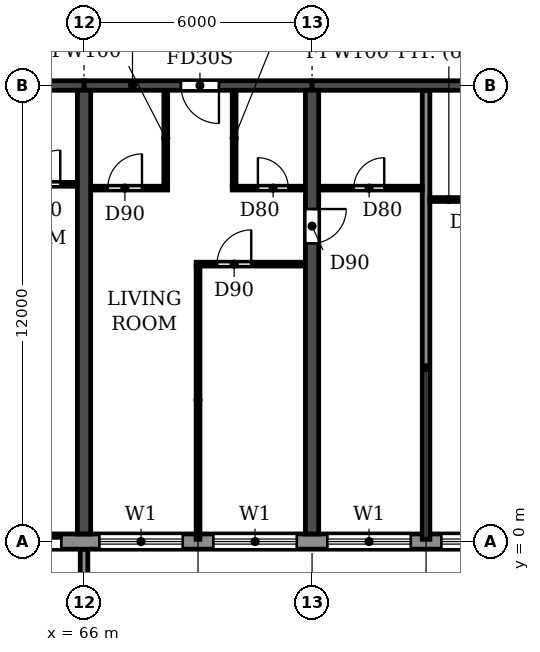
"""IFC4 building model, lengths in metres.
Left out: names, types, materials, properties, quantities, classifications, styles, units other than length and angle.
Written with IfcOpenShell. Run it as: python <this file> out.ifc"""

import sys

from ifc_helpers import new_model, si_unit, direction, frame, frame_2d, origin, place, context, subcontext, project, spatial, polyline, rectangle, outline, extrude, source, transform, mapped, element, fill, save


model = new_model("IFC4")
c1 = context("Model", 3, precision=1e-05, world=origin(), true_north=direction((0.0, 1.0)))
c2 = subcontext(c1, "Body", "Model", "MODEL_VIEW")
j1 = project(units=[si_unit("LENGTHUNIT", "METRE"), si_unit("PLANEANGLEUNIT", "RADIAN")], contexts=[c1])
p1 = place(None, origin())
s1 = spatial("IfcSite", under=j1, at=p1, CompositionType="ELEMENT")
p2 = place(p1, origin())
s2 = spatial("IfcBuilding", under=s1, at=p2, CompositionType="ELEMENT")
p3 = place(p2, frame((0.0, 0.0, 112.5)))
s3 = spatial("IfcBuildingStorey", under=s2, at=p3, CompositionType="ELEMENT", Elevation=112.5)
p4 = place(p3, frame((66.0, 0.2, 0.0), z_axis=(0.0, 0.0, 1.0), x_axis=(0.0, 1.0, 0.0)))
e1 = element("IfcWall", 1, at=p4, inside=s3, PredefinedType="SHEAR", context=c2, shape_type="SweptSolid", body=[
    extrude(rectangle(XDim=11.675, YDim=0.35, at=frame_2d((5.837, 0.0))), origin(), (0.0, 0.0, 1.0), 2.95),
])
p5 = place(p3, frame((72.0, 0.2, 0.0), z_axis=(0.0, 0.0, 1.0), x_axis=(0.0, 1.0, 0.0)))
e2 = element("IfcWall", 2, at=p5, inside=s3, PredefinedType="SHEAR", context=c2, shape_type="SweptSolid", body=[
    extrude(rectangle(XDim=11.675, YDim=0.35, at=frame_2d((5.837, 0.0))), origin(), (0.0, 0.0, 1.0), 2.95),
])
p6 = place(p5, frame((7.65, 0.0, 0.0)))
e3 = element("IfcOpeningElement", 3, at=p6, cuts=e2, PredefinedType="OPENING", context=c2, shape_type="SweptSolid", body=[
    extrude(rectangle(XDim=0.9, YDim=2.1, at=frame_2d((0.45, 1.05))), frame((0.0, 0.185, 0.0), z_axis=(0.0, -1.0, 0.0), x_axis=(1.0, 0.0, 0.0)), (0.0, 0.0, 1.0), 0.37),
])
p7 = place(p3, frame((60.0, 12.0, 0.0), z_axis=(0.0, 0.0, 1.0), x_axis=(1.0, 0.0, 0.0)))
e4 = element("IfcWall", 4, at=p7, inside=s3, PredefinedType="SHEAR", context=c2, shape_type="SweptSolid", body=[
    extrude(rectangle(XDim=6.0, YDim=0.25, at=frame_2d((3.0, 0.0))), origin(), (0.0, 0.0, 1.0), 2.35),
])
p8 = place(p7, frame((2.45, 0.0, 0.0)))
e5 = element("IfcOpeningElement", 5, at=p8, cuts=e4, PredefinedType="OPENING", context=c2, shape_type="SweptSolid", body=[
    extrude(rectangle(XDim=1.0, YDim=2.1, at=frame_2d((0.5, 1.05))), frame((0.0, 0.135, 0.0), z_axis=(0.0, -1.0, 0.0), x_axis=(1.0, 0.0, 0.0)), (0.0, 0.0, 1.0), 0.27),
])
p9 = place(p3, frame((66.0, 12.0, 0.0), z_axis=(0.0, 0.0, 1.0), x_axis=(1.0, 0.0, 0.0)))
e6 = element("IfcWall", 6, at=p9, inside=s3, PredefinedType="SHEAR", context=c2, shape_type="SweptSolid", body=[
    extrude(rectangle(XDim=6.0, YDim=0.25, at=frame_2d((3.0, 0.0))), origin(), (0.0, 0.0, 1.0), 2.35),
])
p10 = place(p9, frame((2.55, 0.0, 0.0)))
e7 = element("IfcOpeningElement", 7, at=p10, cuts=e6, PredefinedType="OPENING", context=c2, shape_type="SweptSolid", body=[
    extrude(rectangle(XDim=1.0, YDim=2.1, at=frame_2d((0.5, 1.05))), frame((0.0, 0.135, 0.0), z_axis=(0.0, -1.0, 0.0), x_axis=(1.0, 0.0, 0.0)), (0.0, 0.0, 1.0), 0.27),
])
p11 = place(p3, frame((72.0, 12.0, 0.0), z_axis=(0.0, 0.0, 1.0), x_axis=(1.0, 0.0, 0.0)))
e8 = element("IfcWall", 8, at=p11, inside=s3, PredefinedType="SHEAR", context=c2, shape_type="SweptSolid", body=[
    extrude(rectangle(XDim=6.0, YDim=0.25, at=frame_2d((3.0, 0.0))), origin(), (0.0, 0.0, 1.0), 2.35),
])
p12 = place(p3, frame((16.683, 0.0, 0.0), z_axis=(0.0, 0.0, 1.0), x_axis=(1.0, 0.0, 0.0)))
e9 = element("IfcWall", 9, at=p12, inside=s3, PredefinedType="STANDARD", context=c2, shape_type="SweptSolid", body=[
    extrude(rectangle(XDim=68.634, YDim=0.4, at=frame_2d((34.317, 0.0))), origin(), (0.0, 0.0, 1.0), 2.95),
])
p13 = place(p12, frame((1.717, 0.0, 0.9)))
e10 = element("IfcOpeningElement", 10, at=p13, cuts=e9, PredefinedType="OPENING", context=c2, shape_type="SweptSolid", body=[
    extrude(rectangle(XDim=2.2, YDim=1.5, at=frame_2d((1.1, 0.75))), frame((0.0, 0.21, 0.0), z_axis=(0.0, -1.0, 0.0), x_axis=(1.0, 0.0, 0.0)), (0.0, 0.0, 1.0), 0.42),
])
p14 = place(p12, frame((4.717, 0.0, 0.9)))
e11 = element("IfcOpeningElement", 11, at=p14, cuts=e9, PredefinedType="OPENING", context=c2, shape_type="SweptSolid", body=[
    extrude(rectangle(XDim=2.2, YDim=1.5, at=frame_2d((1.1, 0.75))), frame((0.0, 0.21, 0.0), z_axis=(0.0, -1.0, 0.0), x_axis=(1.0, 0.0, 0.0)), (0.0, 0.0, 1.0), 0.42),
])
p15 = place(p12, frame((7.717, 0.0, 0.9)))
e12 = element("IfcOpeningElement", 12, at=p15, cuts=e9, PredefinedType="OPENING", context=c2, shape_type="SweptSolid", body=[
    extrude(rectangle(XDim=2.2, YDim=1.5, at=frame_2d((1.1, 0.75))), frame((0.0, 0.21, 0.0), z_axis=(0.0, -1.0, 0.0), x_axis=(1.0, 0.0, 0.0)), (0.0, 0.0, 1.0), 0.42),
])
p16 = place(p12, frame((10.917, 0.0, 0.0)))
e13 = element("IfcOpeningElement", 13, at=p16, cuts=e9, PredefinedType="OPENING", context=c2, shape_type="SweptSolid", body=[
    extrude(rectangle(XDim=1.8, YDim=2.4, at=frame_2d((0.9, 1.2))), frame((0.0, 0.21, 0.0), z_axis=(0.0, -1.0, 0.0), x_axis=(1.0, 0.0, 0.0)), (0.0, 0.0, 1.0), 0.42),
])
p17 = place(p12, frame((13.717, 0.0, 0.9)))
e14 = element("IfcOpeningElement", 14, at=p17, cuts=e9, PredefinedType="OPENING", context=c2, shape_type="SweptSolid", body=[
    extrude(rectangle(XDim=2.2, YDim=1.5, at=frame_2d((1.1, 0.75))), frame((0.0, 0.21, 0.0), z_axis=(0.0, -1.0, 0.0), x_axis=(1.0, 0.0, 0.0)), (0.0, 0.0, 1.0), 0.42),
])
p18 = place(p12, frame((16.717, 0.0, 0.9)))
e15 = element("IfcOpeningElement", 15, at=p18, cuts=e9, PredefinedType="OPENING", context=c2, shape_type="SweptSolid", body=[
    extrude(rectangle(XDim=2.2, YDim=1.5, at=frame_2d((1.1, 0.75))), frame((0.0, 0.21, 0.0), z_axis=(0.0, -1.0, 0.0), x_axis=(1.0, 0.0, 0.0)), (0.0, 0.0, 1.0), 0.42),
])
p19 = place(p12, frame((19.717, 0.0, 0.9)))
e16 = element("IfcOpeningElement", 16, at=p19, cuts=e9, PredefinedType="OPENING", context=c2, shape_type="SweptSolid", body=[
    extrude(rectangle(XDim=2.2, YDim=1.5, at=frame_2d((1.1, 0.75))), frame((0.0, 0.21, 0.0), z_axis=(0.0, -1.0, 0.0), x_axis=(1.0, 0.0, 0.0)), (0.0, 0.0, 1.0), 0.42),
])
p20 = place(p12, frame((22.717, 0.0, 0.9)))
e17 = element("IfcOpeningElement", 17, at=p20, cuts=e9, PredefinedType="OPENING", context=c2, shape_type="SweptSolid", body=[
    extrude(rectangle(XDim=2.2, YDim=1.5, at=frame_2d((1.1, 0.75))), frame((0.0, 0.21, 0.0), z_axis=(0.0, -1.0, 0.0), x_axis=(1.0, 0.0, 0.0)), (0.0, 0.0, 1.0), 0.42),
])
p21 = place(p12, frame((25.717, 0.0, 0.9)))
e18 = element("IfcOpeningElement", 18, at=p21, cuts=e9, PredefinedType="OPENING", context=c2, shape_type="SweptSolid", body=[
    extrude(rectangle(XDim=2.2, YDim=1.5, at=frame_2d((1.1, 0.75))), frame((0.0, 0.21, 0.0), z_axis=(0.0, -1.0, 0.0), x_axis=(1.0, 0.0, 0.0)), (0.0, 0.0, 1.0), 0.42),
])
p22 = place(p12, frame((28.717, 0.0, 0.9)))
e19 = element("IfcOpeningElement", 19, at=p22, cuts=e9, PredefinedType="OPENING", context=c2, shape_type="SweptSolid", body=[
    extrude(rectangle(XDim=2.2, YDim=1.5, at=frame_2d((1.1, 0.75))), frame((0.0, 0.21, 0.0), z_axis=(0.0, -1.0, 0.0), x_axis=(1.0, 0.0, 0.0)), (0.0, 0.0, 1.0), 0.42),
])
p23 = place(p12, frame((31.917, 0.0, 0.0)))
e20 = element("IfcOpeningElement", 20, at=p23, cuts=e9, PredefinedType="OPENING", context=c2, shape_type="SweptSolid", body=[
    extrude(rectangle(XDim=1.8, YDim=2.4, at=frame_2d((0.9, 1.2))), frame((0.0, 0.21, 0.0), z_axis=(0.0, -1.0, 0.0), x_axis=(1.0, 0.0, 0.0)), (0.0, 0.0, 1.0), 0.42),
])
p24 = place(p12, frame((34.717, 0.0, 0.9)))
e21 = element("IfcOpeningElement", 21, at=p24, cuts=e9, PredefinedType="OPENING", context=c2, shape_type="SweptSolid", body=[
    extrude(rectangle(XDim=2.2, YDim=1.5, at=frame_2d((1.1, 0.75))), frame((0.0, 0.21, 0.0), z_axis=(0.0, -1.0, 0.0), x_axis=(1.0, 0.0, 0.0)), (0.0, 0.0, 1.0), 0.42),
])
p25 = place(p12, frame((37.717, 0.0, 0.9)))
e22 = element("IfcOpeningElement", 22, at=p25, cuts=e9, PredefinedType="OPENING", context=c2, shape_type="SweptSolid", body=[
    extrude(rectangle(XDim=2.2, YDim=1.5, at=frame_2d((1.1, 0.75))), frame((0.0, 0.21, 0.0), z_axis=(0.0, -1.0, 0.0), x_axis=(1.0, 0.0, 0.0)), (0.0, 0.0, 1.0), 0.42),
])
p26 = place(p12, frame((40.717, 0.0, 0.9)))
e23 = element("IfcOpeningElement", 23, at=p26, cuts=e9, PredefinedType="OPENING", context=c2, shape_type="SweptSolid", body=[
    extrude(rectangle(XDim=2.2, YDim=1.5, at=frame_2d((1.1, 0.75))), frame((0.0, 0.21, 0.0), z_axis=(0.0, -1.0, 0.0), x_axis=(1.0, 0.0, 0.0)), (0.0, 0.0, 1.0), 0.42),
])
p27 = place(p12, frame((43.717, 0.0, 0.9)))
e24 = element("IfcOpeningElement", 24, at=p27, cuts=e9, PredefinedType="OPENING", context=c2, shape_type="SweptSolid", body=[
    extrude(rectangle(XDim=2.2, YDim=1.5, at=frame_2d((1.1, 0.75))), frame((0.0, 0.21, 0.0), z_axis=(0.0, -1.0, 0.0), x_axis=(1.0, 0.0, 0.0)), (0.0, 0.0, 1.0), 0.42),
])
p28 = place(p12, frame((46.917, 0.0, 0.0)))
e25 = element("IfcOpeningElement", 25, at=p28, cuts=e9, PredefinedType="OPENING", context=c2, shape_type="SweptSolid", body=[
    extrude(rectangle(XDim=1.8, YDim=2.4, at=frame_2d((0.9, 1.2))), frame((0.0, 0.21, 0.0), z_axis=(0.0, -1.0, 0.0), x_axis=(1.0, 0.0, 0.0)), (0.0, 0.0, 1.0), 0.42),
])
p29 = place(p12, frame((49.717, 0.0, 0.9)))
e26 = element("IfcOpeningElement", 26, at=p29, cuts=e9, PredefinedType="OPENING", context=c2, shape_type="SweptSolid", body=[
    extrude(rectangle(XDim=2.2, YDim=1.5, at=frame_2d((1.1, 0.75))), frame((0.0, 0.21, 0.0), z_axis=(0.0, -1.0, 0.0), x_axis=(1.0, 0.0, 0.0)), (0.0, 0.0, 1.0), 0.42),
])
p30 = place(p12, frame((52.717, 0.0, 0.9)))
e27 = element("IfcOpeningElement", 27, at=p30, cuts=e9, PredefinedType="OPENING", context=c2, shape_type="SweptSolid", body=[
    extrude(rectangle(XDim=2.2, YDim=1.5, at=frame_2d((1.1, 0.75))), frame((0.0, 0.21, 0.0), z_axis=(0.0, -1.0, 0.0), x_axis=(1.0, 0.0, 0.0)), (0.0, 0.0, 1.0), 0.42),
])
p31 = place(p12, frame((55.717, 0.0, 0.9)))
e28 = element("IfcOpeningElement", 28, at=p31, cuts=e9, PredefinedType="OPENING", context=c2, shape_type="SweptSolid", body=[
    extrude(rectangle(XDim=2.2, YDim=1.5, at=frame_2d((1.1, 0.75))), frame((0.0, 0.21, 0.0), z_axis=(0.0, -1.0, 0.0), x_axis=(1.0, 0.0, 0.0)), (0.0, 0.0, 1.0), 0.42),
])
p32 = place(p12, frame((58.717, 0.0, 0.9)))
e29 = element("IfcOpeningElement", 29, at=p32, cuts=e9, PredefinedType="OPENING", context=c2, shape_type="SweptSolid", body=[
    extrude(rectangle(XDim=2.2, YDim=1.5, at=frame_2d((1.1, 0.75))), frame((0.0, 0.21, 0.0), z_axis=(0.0, -1.0, 0.0), x_axis=(1.0, 0.0, 0.0)), (0.0, 0.0, 1.0), 0.42),
])
p33 = place(p12, frame((61.717, 0.0, 0.9)))
e30 = element("IfcOpeningElement", 30, at=p33, cuts=e9, PredefinedType="OPENING", context=c2, shape_type="SweptSolid", body=[
    extrude(rectangle(XDim=2.2, YDim=1.5, at=frame_2d((1.1, 0.75))), frame((0.0, 0.21, 0.0), z_axis=(0.0, -1.0, 0.0), x_axis=(1.0, 0.0, 0.0)), (0.0, 0.0, 1.0), 0.42),
])
p34 = place(p12, frame((64.717, 0.0, 0.9)))
e31 = element("IfcOpeningElement", 31, at=p34, cuts=e9, PredefinedType="OPENING", context=c2, shape_type="SweptSolid", body=[
    extrude(rectangle(XDim=2.2, YDim=1.5, at=frame_2d((1.1, 0.75))), frame((0.0, 0.21, 0.0), z_axis=(0.0, -1.0, 0.0), x_axis=(1.0, 0.0, 0.0)), (0.0, 0.0, 1.0), 0.42),
])
m1 = source(origin(), c2, "Body", "SweptSolid", [
    extrude(outline(polyline([(0.0, 0.0), (0.2, 0.0), (0.2, 1.65), (0.0, 1.65), (0.0, 0.0)])), origin(), (0.0, 0.0, 1.0), 3.1),
])
p35 = place(p3, frame((65.9, -1.85, 0.0)))
e32 = element("IfcWall", 32, at=p35, inside=s3, PredefinedType="STANDARD", context=c2, shape_type="MappedRepresentation", body=[
    mapped(m1, transform((0.0, 0.0, 0.0))),
])
p36 = place(p3, frame((75.0, 0.06, 0.0), z_axis=(0.0, 0.0, 1.0), x_axis=(0.0, 1.0, 0.0)))
e33 = element("IfcWall", 33, at=p36, inside=s3, PredefinedType="PARTITIONING", context=c2, shape_type="SweptSolid", body=[
    extrude(rectangle(XDim=11.805, YDim=0.2, at=frame_2d((5.902, 0.0))), origin(), (0.0, 0.0, 1.0), 2.95),
])
p37 = place(p3, frame((68.95, 7.3, 0.0), z_axis=(0.0, 0.0, 1.0), x_axis=(1.0, 0.0, 0.0)))
e34 = element("IfcWall", 34, at=p37, inside=s3, PredefinedType="PARTITIONING", context=c2, shape_type="SweptSolid", body=[
    extrude(rectangle(XDim=2.865, YDim=0.1, at=frame_2d((1.433, 0.0))), origin(), (0.0, 0.0, 1.0), 2.95),
])
p38 = place(p37, frame((0.55, 0.0, 0.0)))
e35 = element("IfcOpeningElement", 35, at=p38, cuts=e34, PredefinedType="OPENING", context=c2, shape_type="SweptSolid", body=[
    extrude(rectangle(XDim=0.9, YDim=2.1, at=frame_2d((0.45, 1.05))), frame((0.0, 0.06, 0.0), z_axis=(0.0, -1.0, 0.0), x_axis=(1.0, 0.0, 0.0)), (0.0, 0.0, 1.0), 0.12),
])
p39 = place(p3, frame((75.1, 9.0, 0.0), z_axis=(0.0, 0.0, 1.0), x_axis=(1.0, 0.0, 0.0)))
e36 = element("IfcWall", 36, at=p39, inside=s3, PredefinedType="PARTITIONING", context=c2, shape_type="SweptSolid", body=[
    extrude(rectangle(XDim=2.715, YDim=0.1, at=frame_2d((1.357, 0.0))), origin(), (0.0, 0.0, 1.0), 2.95),
])
p40 = place(p39, frame((1.0, 0.0, 0.0)))
e37 = element("IfcOpeningElement", 37, at=p40, cuts=e36, PredefinedType="OPENING", context=c2, shape_type="SweptSolid", body=[
    extrude(rectangle(XDim=0.8, YDim=2.1, at=frame_2d((0.4, 1.05))), frame((0.0, 0.06, 0.0), z_axis=(0.0, -1.0, 0.0), x_axis=(1.0, 0.0, 0.0)), (0.0, 0.0, 1.0), 0.12),
])
p41 = place(p3, frame((66.185, 9.3, 0.0), z_axis=(0.0, 0.0, 1.0), x_axis=(1.0, 0.0, 0.0)))
e38 = element("IfcWall", 38, at=p41, inside=s3, PredefinedType="PARTITIONING", context=c2, shape_type="SweptSolid", body=[
    extrude(rectangle(XDim=2.015, YDim=0.1, at=frame_2d((1.007, 0.0))), origin(), (0.0, 0.0, 1.0), 2.95),
])
p42 = place(p41, frame((0.44, 0.0, 0.0)))
e39 = element("IfcOpeningElement", 39, at=p42, cuts=e38, PredefinedType="OPENING", context=c2, shape_type="SweptSolid", body=[
    extrude(rectangle(XDim=0.9, YDim=2.1, at=frame_2d((0.45, 1.05))), frame((0.0, 0.06, 0.0), z_axis=(0.0, -1.0, 0.0), x_axis=(1.0, 0.0, 0.0)), (0.0, 0.0, 1.0), 0.12),
])
p43 = place(p3, frame((69.9, 9.3, 0.0), z_axis=(0.0, 0.0, 1.0), x_axis=(1.0, 0.0, 0.0)))
e40 = element("IfcWall", 40, at=p43, inside=s3, PredefinedType="PARTITIONING", context=c2, shape_type="SweptSolid", body=[
    extrude(rectangle(XDim=1.915, YDim=0.1, at=frame_2d((0.958, 0.0))), origin(), (0.0, 0.0, 1.0), 2.95),
])
p44 = place(p43, frame((0.675, 0.0, 0.0)))
e41 = element("IfcOpeningElement", 41, at=p44, cuts=e40, PredefinedType="OPENING", context=c2, shape_type="SweptSolid", body=[
    extrude(rectangle(XDim=0.8, YDim=2.1, at=frame_2d((0.4, 1.05))), frame((0.0, 0.06, 0.0), z_axis=(0.0, -1.0, 0.0), x_axis=(1.0, 0.0, 0.0)), (0.0, 0.0, 1.0), 0.12),
])
p45 = place(p3, frame((72.185, 9.3, 0.0), z_axis=(0.0, 0.0, 1.0), x_axis=(1.0, 0.0, 0.0)))
e42 = element("IfcWall", 42, at=p45, inside=s3, PredefinedType="PARTITIONING", context=c2, shape_type="SweptSolid", body=[
    extrude(rectangle(XDim=2.715, YDim=0.1, at=frame_2d((1.357, 0.0))), origin(), (0.0, 0.0, 1.0), 2.95),
])
p46 = place(p45, frame((0.915, 0.0, 0.0)))
e43 = element("IfcOpeningElement", 43, at=p46, cuts=e42, PredefinedType="OPENING", context=c2, shape_type="SweptSolid", body=[
    extrude(rectangle(XDim=0.8, YDim=2.1, at=frame_2d((0.4, 1.05))), frame((0.0, 0.06, 0.0), z_axis=(0.0, -1.0, 0.0), x_axis=(1.0, 0.0, 0.0)), (0.0, 0.0, 1.0), 0.12),
])
p47 = place(p3, frame((63.8, 9.4, 0.0), z_axis=(0.0, 0.0, 1.0), x_axis=(1.0, 0.0, 0.0)))
e44 = element("IfcWall", 44, at=p47, inside=s3, PredefinedType="PARTITIONING", context=c2, shape_type="SweptSolid", body=[
    extrude(rectangle(XDim=2.015, YDim=0.1, at=frame_2d((1.007, 0.0))), origin(), (0.0, 0.0, 1.0), 2.95),
])
p48 = place(p47, frame((0.675, 0.0, 0.0)))
e45 = element("IfcOpeningElement", 45, at=p48, cuts=e44, PredefinedType="OPENING", context=c2, shape_type="SweptSolid", body=[
    extrude(rectangle(XDim=0.9, YDim=2.1, at=frame_2d((0.45, 1.05))), frame((0.0, 0.06, 0.0), z_axis=(0.0, -1.0, 0.0), x_axis=(1.0, 0.0, 0.0)), (0.0, 0.0, 1.0), 0.12),
])
p49 = place(p3, frame((68.15, 9.35, 0.0), z_axis=(0.0, 0.0, 1.0), x_axis=(0.0, 1.0, 0.0)))
e46 = element("IfcWall", 46, at=p49, inside=s3, PredefinedType="PARTITIONING", context=c2, shape_type="SweptSolid", body=[
    extrude(rectangle(XDim=2.515, YDim=0.1, at=frame_2d((1.257, 0.0))), origin(), (0.0, 0.0, 1.0), 2.95),
])
p50 = place(p3, frame((69.0, 0.06, 0.0), z_axis=(0.0, 0.0, 1.0), x_axis=(0.0, 1.0, 0.0)))
e47 = element("IfcWall", 47, at=p50, inside=s3, PredefinedType="PARTITIONING", context=c2, shape_type="SweptSolid", body=[
    extrude(rectangle(XDim=7.19, YDim=0.1, at=frame_2d((3.595, 0.0))), origin(), (0.0, 0.0, 1.0), 2.95),
])
p51 = place(p3, frame((69.95, 9.35, 0.0), z_axis=(0.0, 0.0, 1.0), x_axis=(0.0, 1.0, 0.0)))
e48 = element("IfcWall", 48, at=p51, inside=s3, PredefinedType="PARTITIONING", context=c2, shape_type="SweptSolid", body=[
    extrude(rectangle(XDim=2.515, YDim=0.1, at=frame_2d((1.257, 0.0))), origin(), (0.0, 0.0, 1.0), 2.95),
])
p52 = place(p28, origin())
e49 = element("IfcDoor", 49, at=p52, inside=s3, OperationType="DOUBLE_DOOR_SLIDING", PredefinedType="DOOR", context=c2, shape_type="SweptSolid", body=[
    extrude(rectangle(XDim=1.8, YDim=2.4, at=frame_2d((0.9, 1.2))), frame((0.0, 0.025, 0.0), z_axis=(0.0, -1.0, 0.0), x_axis=(1.0, 0.0, 0.0)), (0.0, 0.0, 1.0), 0.05),
])
fill(e25, e49)
p53 = place(p29, origin())
e50 = element("IfcWindow", 50, at=p53, inside=s3, PartitioningType="DOUBLE_PANEL_HORIZONTAL", PredefinedType="WINDOW", context=c2, shape_type="SweptSolid", body=[
    extrude(rectangle(XDim=2.2, YDim=1.5, at=frame_2d((1.1, 0.75))), frame((0.0, 0.03, 0.0), z_axis=(0.0, -1.0, 0.0), x_axis=(1.0, 0.0, 0.0)), (0.0, 0.0, 1.0), 0.06),
])
fill(e26, e50)
p54 = place(p30, origin())
e51 = element("IfcWindow", 51, at=p54, inside=s3, PartitioningType="DOUBLE_PANEL_HORIZONTAL", PredefinedType="WINDOW", context=c2, shape_type="SweptSolid", body=[
    extrude(rectangle(XDim=2.2, YDim=1.5, at=frame_2d((1.1, 0.75))), frame((0.0, 0.03, 0.0), z_axis=(0.0, -1.0, 0.0), x_axis=(1.0, 0.0, 0.0)), (0.0, 0.0, 1.0), 0.06),
])
fill(e27, e51)
p55 = place(p31, origin())
e52 = element("IfcWindow", 52, at=p55, inside=s3, PartitioningType="DOUBLE_PANEL_HORIZONTAL", PredefinedType="WINDOW", context=c2, shape_type="SweptSolid", body=[
    extrude(rectangle(XDim=2.2, YDim=1.5, at=frame_2d((1.1, 0.75))), frame((0.0, 0.03, 0.0), z_axis=(0.0, -1.0, 0.0), x_axis=(1.0, 0.0, 0.0)), (0.0, 0.0, 1.0), 0.06),
])
fill(e28, e52)
p56 = place(p32, origin())
e53 = element("IfcWindow", 53, at=p56, inside=s3, PartitioningType="DOUBLE_PANEL_HORIZONTAL", PredefinedType="WINDOW", context=c2, shape_type="SweptSolid", body=[
    extrude(rectangle(XDim=2.2, YDim=1.5, at=frame_2d((1.1, 0.75))), frame((0.0, 0.03, 0.0), z_axis=(0.0, -1.0, 0.0), x_axis=(1.0, 0.0, 0.0)), (0.0, 0.0, 1.0), 0.06),
])
fill(e29, e53)
p57 = place(p48, origin())
e54 = element("IfcDoor", 54, at=p57, inside=s3, OperationType="SINGLE_SWING_RIGHT", PredefinedType="DOOR", context=c2, shape_type="SweptSolid", body=[
    extrude(rectangle(XDim=0.9, YDim=2.1, at=frame_2d((0.45, 1.05))), frame((0.0, 0.025, 0.0), z_axis=(0.0, -1.0, 0.0), x_axis=(1.0, 0.0, 0.0)), (0.0, 0.0, 1.0), 0.05),
])
fill(e45, e54)
p58 = place(p46, origin())
e55 = element("IfcDoor", 55, at=p58, inside=s3, OperationType="SINGLE_SWING_RIGHT", PredefinedType="DOOR", context=c2, shape_type="SweptSolid", body=[
    extrude(rectangle(XDim=0.8, YDim=2.1, at=frame_2d((0.4, 1.05))), frame((0.0, 0.025, 0.0), z_axis=(0.0, -1.0, 0.0), x_axis=(1.0, 0.0, 0.0)), (0.0, 0.0, 1.0), 0.05),
])
fill(e43, e55)
p59 = place(p42, origin())
e56 = element("IfcDoor", 56, at=p59, inside=s3, OperationType="SINGLE_SWING_RIGHT", PredefinedType="DOOR", context=c2, shape_type="SweptSolid", body=[
    extrude(rectangle(XDim=0.9, YDim=2.1, at=frame_2d((0.45, 1.05))), frame((0.0, 0.025, 0.0), z_axis=(0.0, -1.0, 0.0), x_axis=(1.0, 0.0, 0.0)), (0.0, 0.0, 1.0), 0.05),
])
fill(e39, e56)
p60 = place(p10, frame((1.0, 0.0, 0.0), z_axis=(0.0, 0.0, 1.0), x_axis=(-1.0, 0.0, 0.0)))
e57 = element("IfcDoor", 57, at=p60, inside=s3, OperationType="SINGLE_SWING_LEFT", PredefinedType="DOOR", context=c2, shape_type="SweptSolid", body=[
    extrude(rectangle(XDim=1.0, YDim=2.1, at=frame_2d((0.5, 1.05))), frame((0.0, 0.025, 0.0), z_axis=(0.0, -1.0, 0.0), x_axis=(1.0, 0.0, 0.0)), (0.0, 0.0, 1.0), 0.05),
])
fill(e7, e57)
p61 = place(p38, origin())
e58 = element("IfcDoor", 58, at=p61, inside=s3, OperationType="SINGLE_SWING_RIGHT", PredefinedType="DOOR", context=c2, shape_type="SweptSolid", body=[
    extrude(rectangle(XDim=0.9, YDim=2.1, at=frame_2d((0.45, 1.05))), frame((0.0, 0.025, 0.0), z_axis=(0.0, -1.0, 0.0), x_axis=(1.0, 0.0, 0.0)), (0.0, 0.0, 1.0), 0.05),
])
fill(e35, e58)
p62 = place(p44, origin())
e59 = element("IfcDoor", 59, at=p62, inside=s3, OperationType="SINGLE_SWING_LEFT", PredefinedType="DOOR", context=c2, shape_type="SweptSolid", body=[
    extrude(rectangle(XDim=0.8, YDim=2.1, at=frame_2d((0.4, 1.05))), frame((0.0, 0.025, 0.0), z_axis=(0.0, -1.0, 0.0), x_axis=(1.0, 0.0, 0.0)), (0.0, 0.0, 1.0), 0.05),
])
fill(e41, e59)
p63 = place(p6, frame((0.9, 0.0, 0.0), z_axis=(0.0, 0.0, 1.0), x_axis=(-1.0, 0.0, 0.0)))
e60 = element("IfcDoor", 60, at=p63, inside=s3, OperationType="SINGLE_SWING_LEFT", PredefinedType="DOOR", context=c2, shape_type="SweptSolid", body=[
    extrude(rectangle(XDim=0.9, YDim=2.1, at=frame_2d((0.45, 1.05))), frame((0.0, 0.025, 0.0), z_axis=(0.0, -1.0, 0.0), x_axis=(1.0, 0.0, 0.0)), (0.0, 0.0, 1.0), 0.05),
])
fill(e3, e60)
save(model, sys.argv[1])
